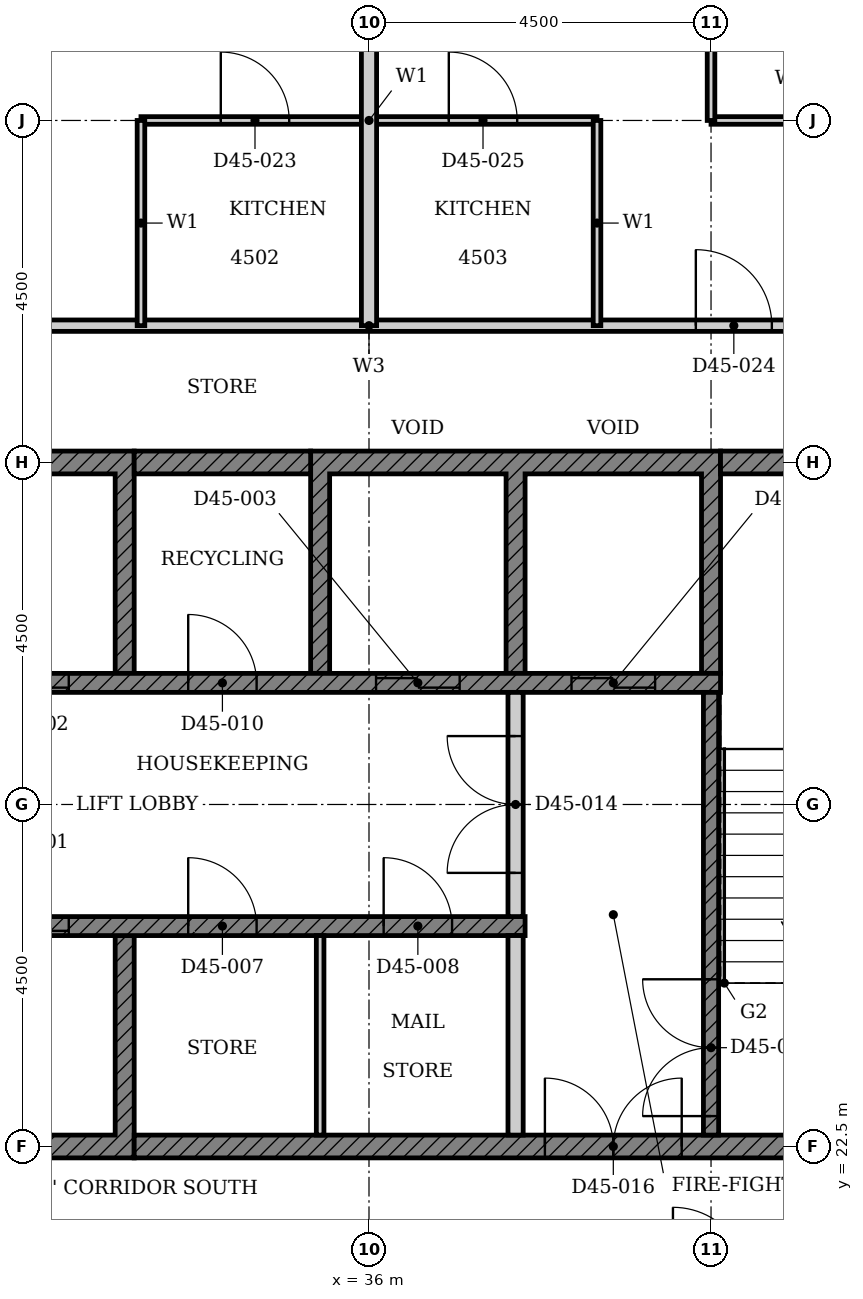
"""IFC4 building model, lengths in metres.
Left out: names, types, materials, properties, quantities, classifications, styles, units other than length and angle.
Written with IfcOpenShell. Run it as: python <this file> out.ifc"""

import sys

from ifc_helpers import new_model, si_unit, direction, frame, frame_2d, origin, place, context, subcontext, project, spatial, polyline, rectangle, outline, extrude, element, fill, save


model = new_model("IFC4")
c1 = context("Model", 3, precision=1e-05, world=origin(), true_north=direction((0.0, 1.0)))
c2 = subcontext(c1, "Body", "Model", "MODEL_VIEW")
j1 = project(units=[si_unit("LENGTHUNIT", "METRE"), si_unit("PLANEANGLEUNIT", "RADIAN")], contexts=[c1])
p1 = place(None, origin())
s1 = spatial("IfcSite", under=j1, at=p1, CompositionType="ELEMENT")
p2 = place(p1, origin())
s2 = spatial("IfcBuilding", under=s1, at=p2, CompositionType="ELEMENT")
p3 = place(p2, frame((0.0, 0.0, 180.2)))
s3 = spatial("IfcBuildingStorey", under=s2, at=p3, CompositionType="ELEMENT", Elevation=180.2)
p4 = place(p3, origin())
e1 = element("IfcWall", 1, at=p4, inside=s3, PredefinedType="SHEAR", context=c2, shape_type="SweptSolid", body=[
    extrude(outline(polyline([(27.518, 22.35), (32.911, 22.35), (32.911, 25.275), (32.661, 25.275), (32.661, 22.65), (30.339, 22.65), (30.339, 25.275), (30.089, 25.275), (30.089, 22.65), (27.768, 22.65), (27.768, 25.275), (27.518, 25.275), (27.518, 22.35)])), origin(), (0.0, 0.0, 1.0), 3.4),
])
p5 = place(p3, origin())
e2 = element("IfcWall", 2, at=p5, inside=s3, PredefinedType="SHEAR", context=c2, shape_type="SweptSolid", body=[
    extrude(outline(polyline([(27.518, 28.725), (27.768, 28.725), (27.768, 31.35), (30.089, 31.35), (30.089, 28.725), (30.339, 28.725), (30.339, 31.35), (32.661, 31.35), (32.661, 28.725), (32.911, 28.725), (32.911, 31.65), (27.518, 31.65), (27.518, 28.725)])), origin(), (0.0, 0.0, 1.0), 3.4),
])
p6 = place(p3, origin())
e3 = element("IfcWall", 3, at=p6, inside=s3, PredefinedType="SHEAR", context=c2, shape_type="SweptSolid", body=[
    extrude(outline(polyline([(35.232, 28.725), (35.482, 28.725), (35.482, 31.35), (37.803, 31.35), (37.803, 28.725), (38.053, 28.725), (38.053, 31.35), (40.375, 31.35), (40.375, 28.725), (40.625, 28.725), (40.625, 31.65), (35.232, 31.65), (35.232, 28.725)])), origin(), (0.0, 0.0, 1.0), 3.4),
])
p7 = place(p3, frame((32.911, 22.5, 0.0), z_axis=(0.0, 0.0, 1.0), x_axis=(1.0, 0.0, 0.0)))
e4 = element("IfcWall", 4, at=p7, inside=s3, PredefinedType="SHEAR", context=c2, shape_type="SweptSolid", body=[
    extrude(rectangle(XDim=11.939, YDim=0.3, at=frame_2d((5.97, 0.0))), origin(), (0.0, 0.0, 1.0), 3.4),
])
p8 = place(p7, frame((5.404, 0.0, 0.0)))
e5 = element("IfcOpeningElement", 5, at=p8, cuts=e4, PredefinedType="OPENING", context=c2, shape_type="SweptSolid", body=[
    extrude(rectangle(XDim=1.8, YDim=2.1, at=frame_2d((0.9, 1.05))), frame((0.0, 0.16, 0.0), z_axis=(0.0, -1.0, 0.0), x_axis=(1.0, 0.0, 0.0)), (0.0, 0.0, 1.0), 0.32),
])
p9 = place(p3, frame((32.911, 31.5, 0.0), z_axis=(0.0, 0.0, 1.0), x_axis=(1.0, 0.0, 0.0)))
e6 = element("IfcWall", 6, at=p9, inside=s3, PredefinedType="SHEAR", context=c2, shape_type="SweptSolid", body=[
    extrude(rectangle(XDim=2.322, YDim=0.3, at=frame_2d((1.161, 0.0))), origin(), (0.0, 0.0, 1.0), 3.4),
])
p10 = place(p3, frame((40.625, 31.5, 0.0), z_axis=(0.0, 0.0, 1.0), x_axis=(1.0, 0.0, 0.0)))
e7 = element("IfcWall", 7, at=p10, inside=s3, PredefinedType="SHEAR", context=c2, shape_type="SweptSolid", body=[
    extrude(rectangle(XDim=4.225, YDim=0.3, at=frame_2d((2.113, 0.0))), origin(), (0.0, 0.0, 1.0), 3.4),
])
p11 = place(p3, frame((22.375, 25.4, 0.0), z_axis=(0.0, 0.0, 1.0), x_axis=(1.0, 0.0, 0.0)))
e8 = element("IfcWall", 8, at=p11, inside=s3, PredefinedType="SHEAR", context=c2, shape_type="SweptSolid", body=[
    extrude(rectangle(XDim=15.678, YDim=0.25, at=frame_2d((7.839, 0.0))), origin(), (0.0, 0.0, 1.0), 3.4),
])
p12 = place(p11, frame((8.575, 0.0, 0.0)))
e9 = element("IfcOpeningElement", 9, at=p12, cuts=e8, PredefinedType="OPENING", context=c2, shape_type="SweptSolid", body=[
    extrude(rectangle(XDim=1.1, YDim=2.1, at=frame_2d((0.55, 1.05))), frame((0.0, 0.135, 0.0), z_axis=(0.0, -1.0, 0.0), x_axis=(1.0, 0.0, 0.0)), (0.0, 0.0, 1.0), 0.27),
])
p13 = place(p11, frame((0.861, 0.0, 0.0)))
e10 = element("IfcOpeningElement", 10, at=p13, cuts=e8, PredefinedType="OPENING", context=c2, shape_type="SweptSolid", body=[
    extrude(rectangle(XDim=1.1, YDim=2.1, at=frame_2d((0.55, 1.05))), frame((0.0, 0.135, 0.0), z_axis=(0.0, -1.0, 0.0), x_axis=(1.0, 0.0, 0.0)), (0.0, 0.0, 1.0), 0.27),
])
p14 = place(p11, frame((3.532, 0.0, 0.0)))
e11 = element("IfcOpeningElement", 11, at=p14, cuts=e8, PredefinedType="OPENING", context=c2, shape_type="SweptSolid", body=[
    extrude(rectangle(XDim=0.9, YDim=2.1, at=frame_2d((0.45, 1.05))), frame((0.0, 0.135, 0.0), z_axis=(0.0, -1.0, 0.0), x_axis=(1.0, 0.0, 0.0)), (0.0, 0.0, 1.0), 0.27),
])
p15 = place(p11, frame((11.246, 0.0, 0.0)))
e12 = element("IfcOpeningElement", 12, at=p15, cuts=e8, PredefinedType="OPENING", context=c2, shape_type="SweptSolid", body=[
    extrude(rectangle(XDim=0.9, YDim=2.1, at=frame_2d((0.45, 1.05))), frame((0.0, 0.135, 0.0), z_axis=(0.0, -1.0, 0.0), x_axis=(1.0, 0.0, 0.0)), (0.0, 0.0, 1.0), 0.27),
])
p16 = place(p11, frame((13.818, 0.0, 0.0)))
e13 = element("IfcOpeningElement", 13, at=p16, cuts=e8, PredefinedType="OPENING", context=c2, shape_type="SweptSolid", body=[
    extrude(rectangle(XDim=0.9, YDim=2.1, at=frame_2d((0.45, 1.05))), frame((0.0, 0.135, 0.0), z_axis=(0.0, -1.0, 0.0), x_axis=(1.0, 0.0, 0.0)), (0.0, 0.0, 1.0), 0.27),
])
p17 = place(p3, frame((24.947, 28.6, 0.0), z_axis=(0.0, 0.0, 1.0), x_axis=(1.0, 0.0, 0.0)))
e14 = element("IfcWall", 14, at=p17, inside=s3, PredefinedType="SHEAR", context=c2, shape_type="SweptSolid", body=[
    extrude(rectangle(XDim=15.678, YDim=0.25, at=frame_2d((7.839, 0.0))), origin(), (0.0, 0.0, 1.0), 3.4),
])
p18 = place(p17, frame((6.004, 0.0, 0.0)))
e15 = element("IfcOpeningElement", 15, at=p18, cuts=e14, PredefinedType="OPENING", context=c2, shape_type="SweptSolid", body=[
    extrude(rectangle(XDim=1.1, YDim=2.1, at=frame_2d((0.55, 1.05))), frame((0.0, 0.135, 0.0), z_axis=(0.0, -1.0, 0.0), x_axis=(1.0, 0.0, 0.0)), (0.0, 0.0, 1.0), 0.27),
])
p19 = place(p17, frame((11.146, 0.0, 0.0)))
e16 = element("IfcOpeningElement", 16, at=p19, cuts=e14, PredefinedType="OPENING", context=c2, shape_type="SweptSolid", body=[
    extrude(rectangle(XDim=1.1, YDim=2.1, at=frame_2d((0.55, 1.05))), frame((0.0, 0.135, 0.0), z_axis=(0.0, -1.0, 0.0), x_axis=(1.0, 0.0, 0.0)), (0.0, 0.0, 1.0), 0.27),
])
p20 = place(p17, frame((13.718, 0.0, 0.0)))
e17 = element("IfcOpeningElement", 17, at=p20, cuts=e14, PredefinedType="OPENING", context=c2, shape_type="SweptSolid", body=[
    extrude(rectangle(XDim=1.1, YDim=2.1, at=frame_2d((0.55, 1.05))), frame((0.0, 0.135, 0.0), z_axis=(0.0, -1.0, 0.0), x_axis=(1.0, 0.0, 0.0)), (0.0, 0.0, 1.0), 0.27),
])
p21 = place(p17, frame((0.961, 0.0, 0.0)))
e18 = element("IfcOpeningElement", 18, at=p21, cuts=e14, PredefinedType="OPENING", context=c2, shape_type="SweptSolid", body=[
    extrude(rectangle(XDim=0.9, YDim=2.1, at=frame_2d((0.45, 1.05))), frame((0.0, 0.135, 0.0), z_axis=(0.0, -1.0, 0.0), x_axis=(1.0, 0.0, 0.0)), (0.0, 0.0, 1.0), 0.27),
])
p22 = place(p17, frame((8.675, 0.0, 0.0)))
e19 = element("IfcOpeningElement", 19, at=p22, cuts=e14, PredefinedType="OPENING", context=c2, shape_type="SweptSolid", body=[
    extrude(rectangle(XDim=0.9, YDim=2.1, at=frame_2d((0.45, 1.05))), frame((0.0, 0.135, 0.0), z_axis=(0.0, -1.0, 0.0), x_axis=(1.0, 0.0, 0.0)), (0.0, 0.0, 1.0), 0.27),
])
p23 = place(p3, frame((37.928, 22.65, 0.0), z_axis=(0.0, 0.0, 1.0), x_axis=(0.0, 1.0, 0.0)))
e20 = element("IfcWall", 20, at=p23, inside=s3, PredefinedType="PARTITIONING", context=c2, shape_type="SweptSolid", body=[
    extrude(rectangle(XDim=2.625, YDim=0.2, at=frame_2d((1.312, 0.0))), origin(), (0.0, 0.0, 1.0), 3.4),
])
p24 = place(p3, frame((35.357, 22.65, 0.0), z_axis=(0.0, 0.0, 1.0), x_axis=(0.0, 1.0, 0.0)))
e21 = element("IfcWall", 21, at=p24, inside=s3, PredefinedType="PARTITIONING", context=c2, shape_type="SweptSolid", body=[
    extrude(rectangle(XDim=2.625, YDim=0.1, at=frame_2d((1.312, 0.0))), origin(), (0.0, 0.0, 1.0), 3.4),
])
p25 = place(p3, frame((40.5, 22.65, 0.0), z_axis=(0.0, 0.0, 1.0), x_axis=(0.0, 1.0, 0.0)))
e22 = element("IfcWall", 22, at=p25, inside=s3, PredefinedType="SHEAR", context=c2, shape_type="SweptSolid", body=[
    extrude(rectangle(XDim=5.825, YDim=0.2, at=frame_2d((2.913, 0.0))), origin(), (0.0, 0.0, 1.0), 3.4),
])
p26 = place(p25, frame((0.25, 0.0, 0.0)))
e23 = element("IfcOpeningElement", 23, at=p26, cuts=e22, PredefinedType="OPENING", context=c2, shape_type="SweptSolid", body=[
    extrude(rectangle(XDim=1.8, YDim=2.1, at=frame_2d((0.9, 1.05))), frame((0.0, 0.11, 0.0), z_axis=(0.0, -1.0, 0.0), x_axis=(1.0, 0.0, 0.0)), (0.0, 0.0, 1.0), 0.22),
])
p27 = place(p3, frame((37.928, 25.525, 0.0), z_axis=(0.0, 0.0, 1.0), x_axis=(0.0, 1.0, 0.0)))
e24 = element("IfcWall", 24, at=p27, inside=s3, PredefinedType="PARTITIONING", context=c2, shape_type="SweptSolid", body=[
    extrude(rectangle(XDim=2.95, YDim=0.2, at=frame_2d((1.475, 0.0))), origin(), (0.0, 0.0, 1.0), 3.4),
])
p28 = place(p27, frame((0.575, 0.0, 0.0)))
e25 = element("IfcOpeningElement", 25, at=p28, cuts=e24, PredefinedType="OPENING", context=c2, shape_type="SweptSolid", body=[
    extrude(rectangle(XDim=1.8, YDim=2.1, at=frame_2d((0.9, 1.05))), frame((0.0, 0.11, 0.0), z_axis=(0.0, -1.0, 0.0), x_axis=(1.0, 0.0, 0.0)), (0.0, 0.0, 1.0), 0.22),
])
p29 = place(p3, frame((29.4, 33.3, 0.0), z_axis=(0.0, 0.0, 1.0), x_axis=(1.0, 0.0, 0.0)))
e26 = element("IfcWall", 26, at=p29, inside=s3, PredefinedType="PARTITIONING", context=c2, shape_type="SweptSolid", body=[
    extrude(rectangle(XDim=13.2, YDim=0.15, at=frame_2d((6.6, 0.0))), origin(), (0.0, 0.0, 1.0), 3.4),
])
p30 = place(p29, frame((1.3, 0.0, 0.0)))
e27 = element("IfcOpeningElement", 27, at=p30, cuts=e26, PredefinedType="OPENING", context=c2, shape_type="SweptSolid", body=[
    extrude(rectangle(XDim=1.0, YDim=2.2, at=frame_2d((0.5, 1.1))), frame((0.0, 0.085, 0.0), z_axis=(0.0, -1.0, 0.0), x_axis=(1.0, 0.0, 0.0)), (0.0, 0.0, 1.0), 0.17),
])
p31 = place(p29, frame((10.9, 0.0, 0.0)))
e28 = element("IfcOpeningElement", 28, at=p31, cuts=e26, PredefinedType="OPENING", context=c2, shape_type="SweptSolid", body=[
    extrude(rectangle(XDim=1.0, YDim=2.2, at=frame_2d((0.5, 1.1))), frame((0.0, 0.085, 0.0), z_axis=(0.0, -1.0, 0.0), x_axis=(1.0, 0.0, 0.0)), (0.0, 0.0, 1.0), 0.17),
])
p32 = place(p3, frame((33.0, 36.0, 0.0), z_axis=(0.0, 0.0, 1.0), x_axis=(1.0, 0.0, 0.0)))
e29 = element("IfcWall", 29, at=p32, inside=s3, PredefinedType="PARTITIONING", context=c2, shape_type="SweptSolid", body=[
    extrude(rectangle(XDim=6.0, YDim=0.1, at=frame_2d((3.0, 0.0))), origin(), (0.0, 0.0, 1.0), 3.4),
])
p33 = place(p32, frame((1.05, 0.0, 0.0)))
e30 = element("IfcOpeningElement", 30, at=p33, cuts=e29, PredefinedType="OPENING", context=c2, shape_type="SweptSolid", body=[
    extrude(rectangle(XDim=0.9, YDim=2.1, at=frame_2d((0.45, 1.05))), frame((0.0, 0.06, 0.0), z_axis=(0.0, -1.0, 0.0), x_axis=(1.0, 0.0, 0.0)), (0.0, 0.0, 1.0), 0.12),
])
p34 = place(p32, frame((4.05, 0.0, 0.0)))
e31 = element("IfcOpeningElement", 31, at=p34, cuts=e29, PredefinedType="OPENING", context=c2, shape_type="SweptSolid", body=[
    extrude(rectangle(XDim=0.9, YDim=2.1, at=frame_2d((0.45, 1.05))), frame((0.0, 0.06, 0.0), z_axis=(0.0, -1.0, 0.0), x_axis=(1.0, 0.0, 0.0)), (0.0, 0.0, 1.0), 0.12),
])
p35 = place(p3, frame((40.5, 36.0, 0.0), z_axis=(0.0, 0.0, 1.0), x_axis=(1.0, 0.0, 0.0)))
e32 = element("IfcWall", 32, at=p35, inside=s3, PredefinedType="PARTITIONING", context=c2, shape_type="SweptSolid", body=[
    extrude(rectangle(XDim=2.1, YDim=0.1, at=frame_2d((1.05, 0.0))), origin(), (0.0, 0.0, 1.0), 3.4),
])
for number, where, z_axis, x_axis in (
    (33, (33.0, 33.3, 0.0), (0.0, 0.0, 1.0), (0.0, 1.0, 0.0)),
    (34, (39.0, 33.3, 0.0), (0.0, 0.0, 1.0), (0.0, 1.0, 0.0)),
):
    element("IfcWall", number, at=place(p3, frame(where, z_axis=z_axis, x_axis=x_axis)), inside=s3, PredefinedType="PARTITIONING", context=c2, shape_type="SweptSolid", body=[
        extrude(rectangle(XDim=2.7, YDim=0.1, at=frame_2d((1.35, 0.0))), origin(), (0.0, 0.0, 1.0), 3.4),
    ])
p36 = place(p3, frame((40.5, 36.0, 0.0), z_axis=(0.0, 0.0, 1.0), x_axis=(0.0, 1.0, 0.0)))
e35 = element("IfcWall", 35, at=p36, inside=s3, PredefinedType="PARTITIONING", context=c2, shape_type="SweptSolid", body=[
    extrude(rectangle(XDim=4.815, YDim=0.1, at=frame_2d((2.407, 0.0))), origin(), (0.0, 0.0, 1.0), 3.4),
])
p37 = place(p36, frame((1.8, 0.0, 0.0)))
e36 = element("IfcOpeningElement", 36, at=p37, cuts=e35, PredefinedType="OPENING", context=c2, shape_type="SweptSolid", body=[
    extrude(rectangle(XDim=0.9, YDim=2.1, at=frame_2d((0.45, 1.05))), frame((0.0, 0.06, 0.0), z_axis=(0.0, -1.0, 0.0), x_axis=(1.0, 0.0, 0.0)), (0.0, 0.0, 1.0), 0.12),
])
p38 = place(p3, frame((36.0, 33.3, 0.0), z_axis=(0.0, 0.0, 1.0), x_axis=(0.0, 1.0, 0.0)))
e37 = element("IfcWall", 37, at=p38, inside=s3, PredefinedType="PARTITIONING", context=c2, shape_type="SweptSolid", body=[
    extrude(rectangle(XDim=7.39, YDim=0.2, at=frame_2d((3.695, 0.0))), origin(), (0.0, 0.0, 1.0), 3.4),
])
p39 = place(p12, origin())
e38 = element("IfcDoor", 38, at=p39, inside=s3, OperationType="DOUBLE_DOOR_SLIDING", PredefinedType="DOOR", context=c2, shape_type="SweptSolid", body=[
    extrude(rectangle(XDim=1.1, YDim=2.1, at=frame_2d((0.55, 1.05))), frame((0.0, 0.025, 0.0), z_axis=(0.0, -1.0, 0.0), x_axis=(1.0, 0.0, 0.0)), (0.0, 0.0, 1.0), 0.05),
])
fill(e9, e38)
p40 = place(p18, origin())
e39 = element("IfcDoor", 39, at=p40, inside=s3, OperationType="DOUBLE_DOOR_SLIDING", PredefinedType="DOOR", context=c2, shape_type="SweptSolid", body=[
    extrude(rectangle(XDim=1.1, YDim=2.1, at=frame_2d((0.55, 1.05))), frame((0.0, 0.025, 0.0), z_axis=(0.0, -1.0, 0.0), x_axis=(1.0, 0.0, 0.0)), (0.0, 0.0, 1.0), 0.05),
])
fill(e15, e39)
p41 = place(p19, origin())
e40 = element("IfcDoor", 40, at=p41, inside=s3, OperationType="DOUBLE_DOOR_SLIDING", PredefinedType="DOOR", context=c2, shape_type="SweptSolid", body=[
    extrude(rectangle(XDim=1.1, YDim=2.1, at=frame_2d((0.55, 1.05))), frame((0.0, 0.025, 0.0), z_axis=(0.0, -1.0, 0.0), x_axis=(1.0, 0.0, 0.0)), (0.0, 0.0, 1.0), 0.05),
])
fill(e16, e40)
p42 = place(p20, origin())
e41 = element("IfcDoor", 41, at=p42, inside=s3, OperationType="DOUBLE_DOOR_SLIDING", PredefinedType="DOOR", context=c2, shape_type="SweptSolid", body=[
    extrude(rectangle(XDim=1.1, YDim=2.1, at=frame_2d((0.55, 1.05))), frame((0.0, 0.025, 0.0), z_axis=(0.0, -1.0, 0.0), x_axis=(1.0, 0.0, 0.0)), (0.0, 0.0, 1.0), 0.05),
])
fill(e17, e41)
p43 = place(p15, origin())
e42 = element("IfcDoor", 42, at=p43, inside=s3, OperationType="SINGLE_SWING_LEFT", PredefinedType="DOOR", context=c2, shape_type="SweptSolid", body=[
    extrude(rectangle(XDim=0.9, YDim=2.1, at=frame_2d((0.45, 1.05))), frame((0.0, 0.025, 0.0), z_axis=(0.0, -1.0, 0.0), x_axis=(1.0, 0.0, 0.0)), (0.0, 0.0, 1.0), 0.05),
])
fill(e12, e42)
p44 = place(p16, origin())
e43 = element("IfcDoor", 43, at=p44, inside=s3, OperationType="SINGLE_SWING_LEFT", PredefinedType="DOOR", context=c2, shape_type="SweptSolid", body=[
    extrude(rectangle(XDim=0.9, YDim=2.1, at=frame_2d((0.45, 1.05))), frame((0.0, 0.025, 0.0), z_axis=(0.0, -1.0, 0.0), x_axis=(1.0, 0.0, 0.0)), (0.0, 0.0, 1.0), 0.05),
])
fill(e13, e43)
p45 = place(p22, origin())
e44 = element("IfcDoor", 44, at=p45, inside=s3, OperationType="SINGLE_SWING_LEFT", PredefinedType="DOOR", context=c2, shape_type="SweptSolid", body=[
    extrude(rectangle(XDim=0.9, YDim=2.1, at=frame_2d((0.45, 1.05))), frame((0.0, 0.025, 0.0), z_axis=(0.0, -1.0, 0.0), x_axis=(1.0, 0.0, 0.0)), (0.0, 0.0, 1.0), 0.05),
])
fill(e19, e44)
p46 = place(p26, origin())
e45 = element("IfcDoor", 45, at=p46, inside=s3, OperationType="DOUBLE_DOOR_SINGLE_SWING", PredefinedType="DOOR", context=c2, shape_type="SweptSolid", body=[
    extrude(rectangle(XDim=1.8, YDim=2.1, at=frame_2d((0.9, 1.05))), frame((0.0, 0.025, 0.0), z_axis=(0.0, -1.0, 0.0), x_axis=(1.0, 0.0, 0.0)), (0.0, 0.0, 1.0), 0.05),
])
fill(e23, e45)
p47 = place(p28, origin())
e46 = element("IfcDoor", 46, at=p47, inside=s3, OperationType="DOUBLE_DOOR_SINGLE_SWING", PredefinedType="DOOR", context=c2, shape_type="SweptSolid", body=[
    extrude(rectangle(XDim=1.8, YDim=2.1, at=frame_2d((0.9, 1.05))), frame((0.0, 0.025, 0.0), z_axis=(0.0, -1.0, 0.0), x_axis=(1.0, 0.0, 0.0)), (0.0, 0.0, 1.0), 0.05),
])
fill(e25, e46)
p48 = place(p8, origin())
e47 = element("IfcDoor", 47, at=p48, inside=s3, OperationType="DOUBLE_DOOR_SINGLE_SWING", PredefinedType="DOOR", context=c2, shape_type="SweptSolid", body=[
    extrude(rectangle(XDim=1.8, YDim=2.1, at=frame_2d((0.9, 1.05))), frame((0.0, 0.025, 0.0), z_axis=(0.0, -1.0, 0.0), x_axis=(1.0, 0.0, 0.0)), (0.0, 0.0, 1.0), 0.05),
])
fill(e5, e47)
p49 = place(p33, origin())
e48 = element("IfcDoor", 48, at=p49, inside=s3, OperationType="SINGLE_SWING_LEFT", PredefinedType="DOOR", context=c2, shape_type="SweptSolid", body=[
    extrude(rectangle(XDim=0.9, YDim=2.1, at=frame_2d((0.45, 1.05))), frame((0.0, 0.025, 0.0), z_axis=(0.0, -1.0, 0.0), x_axis=(1.0, 0.0, 0.0)), (0.0, 0.0, 1.0), 0.05),
])
fill(e30, e48)
p50 = place(p31, origin())
e49 = element("IfcDoor", 49, at=p50, inside=s3, OperationType="SINGLE_SWING_LEFT", PredefinedType="DOOR", context=c2, shape_type="SweptSolid", body=[
    extrude(rectangle(XDim=1.0, YDim=2.2, at=frame_2d((0.5, 1.1))), frame((0.0, 0.025, 0.0), z_axis=(0.0, -1.0, 0.0), x_axis=(1.0, 0.0, 0.0)), (0.0, 0.0, 1.0), 0.05),
])
fill(e28, e49)
p51 = place(p34, origin())
e50 = element("IfcDoor", 50, at=p51, inside=s3, OperationType="SINGLE_SWING_LEFT", PredefinedType="DOOR", context=c2, shape_type="SweptSolid", body=[
    extrude(rectangle(XDim=0.9, YDim=2.1, at=frame_2d((0.45, 1.05))), frame((0.0, 0.025, 0.0), z_axis=(0.0, -1.0, 0.0), x_axis=(1.0, 0.0, 0.0)), (0.0, 0.0, 1.0), 0.05),
])
fill(e31, e50)
save(model, sys.argv[1])
